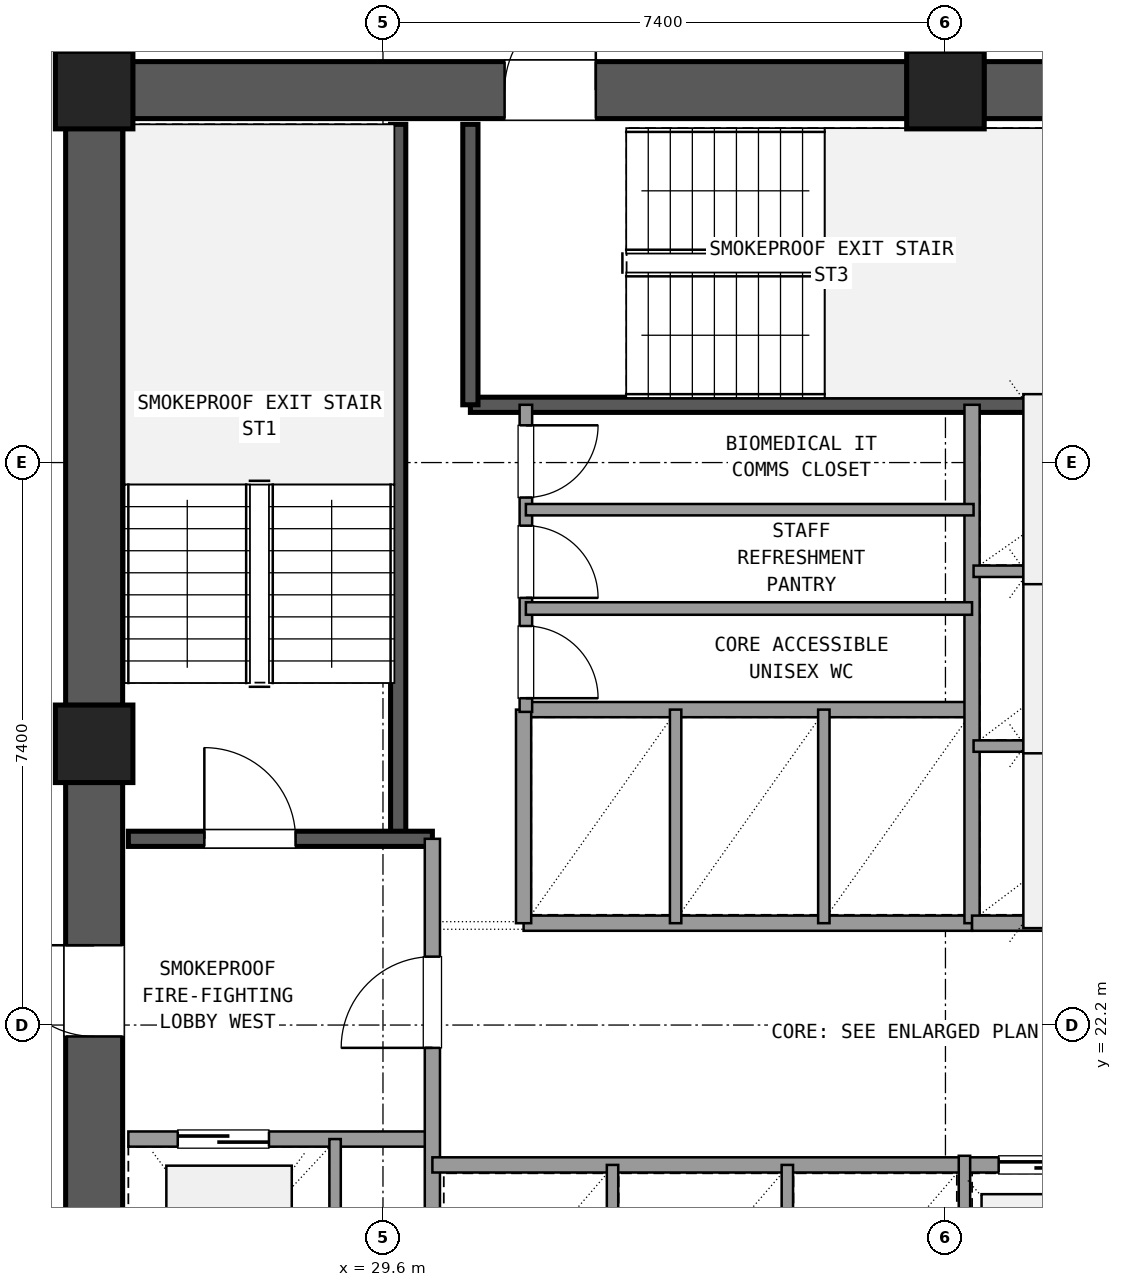
"""IFC4 building model, lengths in metres.
Left out: names, types, materials, properties, quantities, classifications, styles, units other than length and angle.
Written with IfcOpenShell. Run it as: python <this file> out.ifc"""

import sys

from ifc_helpers import new_model, si_unit, direction, frame, frame_2d, origin, origin_2d, place, context, subcontext, project, spatial, rectangle, extrude, element, fill, save


model = new_model("IFC4")
c1 = context("Model", 3, precision=1e-05, world=origin(), true_north=direction((0.0, 1.0)))
c2 = subcontext(c1, "Body", "Model", "MODEL_VIEW")
j1 = project(units=[si_unit("LENGTHUNIT", "METRE"), si_unit("PLANEANGLEUNIT", "RADIAN")], contexts=[c1])
p1 = place(None, origin())
s1 = spatial("IfcSite", under=j1, at=p1, CompositionType="ELEMENT")
p2 = place(p1, origin())
s2 = spatial("IfcBuilding", under=s1, at=p2, CompositionType="ELEMENT")
p3 = place(p2, frame((0.0, 0.0, 81.18)))
s3 = spatial("IfcBuildingStorey", under=s2, at=p3, CompositionType="ELEMENT", Elevation=81.18)
for number, where, z_axis, x_axis in (
    (1, (37.0, 34.5, 0.0), (0.0, 0.0, 1.0), (1.0, 0.0, 0.0)),
    (2, (25.8, 34.5, 0.0), (0.0, 0.0, 1.0), (1.0, 0.0, 0.0)),
    (3, (25.8, 25.9, 0.0), (0.0, 0.0, 1.0), (1.0, 0.0, 0.0)),
):
    element("IfcColumn", number, at=place(p3, frame(where, z_axis=z_axis, x_axis=x_axis)), inside=s3, PredefinedType="COLUMN", context=c2, shape_type="SweptSolid", body=[
        extrude(rectangle(XDim=1.02, YDim=1.02, at=origin_2d()), origin(), (0.0, 0.0, 1.0), 3.6),
    ])
p4 = place(p3, frame((47.695, 34.5, 0.0), z_axis=(0.0, 0.0, 1.0), x_axis=(-1.0, 0.0, 0.0)))
e4 = element("IfcWall", 4, at=p4, inside=s3, PredefinedType="SHEAR", context=c2, shape_type="SweptSolid", body=[
    extrude(rectangle(XDim=10.19, YDim=0.75, at=frame_2d((5.095, 0.0))), origin(), (0.0, 0.0, 1.0), 3.32),
])
p5 = place(p4, frame((4.595, 0.0, 0.0)))
e5 = element("IfcOpeningElement", 5, at=p5, cuts=e4, PredefinedType="OPENING", context=c2, shape_type="SweptSolid", body=[
    extrude(rectangle(XDim=1.6, YDim=2.2, at=frame_2d((0.8, 1.1))), frame((0.0, 0.385, 0.0), z_axis=(0.0, -1.0, 0.0), x_axis=(1.0, 0.0, 0.0)), (0.0, 0.0, 1.0), 0.77),
])
p6 = place(p3, frame((36.495, 34.5, 0.0), z_axis=(0.0, 0.0, 1.0), x_axis=(-1.0, 0.0, 0.0)))
e6 = element("IfcWall", 6, at=p6, inside=s3, PredefinedType="SHEAR", context=c2, shape_type="SweptSolid", body=[
    extrude(rectangle(XDim=10.19, YDim=0.75, at=frame_2d((5.095, 0.0))), origin(), (0.0, 0.0, 1.0), 3.32),
])
p7 = place(p6, frame((4.095, 0.0, 0.0)))
e7 = element("IfcOpeningElement", 7, at=p7, cuts=e6, PredefinedType="OPENING", context=c2, shape_type="SweptSolid", body=[
    extrude(rectangle(XDim=1.2, YDim=2.15, at=frame_2d((0.6, 1.075))), frame((0.0, 0.385, 0.0), z_axis=(0.0, -1.0, 0.0), x_axis=(1.0, 0.0, 0.0)), (0.0, 0.0, 1.0), 0.77),
])
p8 = place(p3, frame((25.8, 33.995, 0.0), z_axis=(0.0, 0.0, 1.0), x_axis=(0.0, -1.0, 0.0)))
e8 = element("IfcWall", 8, at=p8, inside=s3, PredefinedType="SHEAR", context=c2, shape_type="SweptSolid", body=[
    extrude(rectangle(XDim=7.59, YDim=0.75, at=frame_2d((3.795, 0.0))), origin(), (0.0, 0.0, 1.0), 3.32),
])
p9 = place(p3, frame((25.8, 25.395, 0.0), z_axis=(0.0, 0.0, 1.0), x_axis=(0.0, -1.0, 0.0)))
e9 = element("IfcWall", 9, at=p9, inside=s3, PredefinedType="SHEAR", context=c2, shape_type="SweptSolid", body=[
    extrude(rectangle(XDim=7.59, YDim=0.75, at=frame_2d((3.795, 0.0))), origin(), (0.0, 0.0, 1.0), 3.32),
])
p10 = place(p9, frame((2.145, 0.0, 0.0)))
e10 = element("IfcOpeningElement", 10, at=p10, cuts=e9, PredefinedType="OPENING", context=c2, shape_type="SweptSolid", body=[
    extrude(rectangle(XDim=1.2, YDim=2.15, at=frame_2d((0.6, 1.075))), frame((0.0, 0.385, 0.0), z_axis=(0.0, -1.0, 0.0), x_axis=(1.0, 0.0, 0.0)), (0.0, 0.0, 1.0), 0.77),
])
p11 = place(p3, frame((29.8, 24.65, 0.0), z_axis=(0.0, 0.0, 1.0), x_axis=(0.0, 1.0, 0.0)))
e11 = element("IfcWall", 11, at=p11, inside=s3, PredefinedType="SHEAR", context=c2, shape_type="SweptSolid", body=[
    extrude(rectangle(XDim=9.4, YDim=0.2, at=frame_2d((4.7, 0.0))), origin(), (0.0, 0.0, 1.0), 3.32),
])
p12 = place(p3, frame((26.25, 24.65, 0.0), z_axis=(0.0, 0.0, 1.0), x_axis=(1.0, 0.0, 0.0)))
e12 = element("IfcWall", 12, at=p12, inside=s3, PredefinedType="SHEAR", context=c2, shape_type="SweptSolid", body=[
    extrude(rectangle(XDim=4.0, YDim=0.2, at=frame_2d((2.0, 0.0))), origin(), (0.0, 0.0, 1.0), 3.32),
])
p13 = place(p12, frame((1.0, 0.0, 0.0)))
e13 = element("IfcOpeningElement", 13, at=p13, cuts=e12, PredefinedType="OPENING", context=c2, shape_type="SweptSolid", body=[
    extrude(rectangle(XDim=1.2, YDim=2.15, at=frame_2d((0.6, 1.075))), frame((0.0, 0.11, 0.0), z_axis=(0.0, -1.0, 0.0), x_axis=(1.0, 0.0, 0.0)), (0.0, 0.0, 1.0), 0.22),
])
p14 = place(p3, frame((30.75, 30.36, 0.0), z_axis=(0.0, 0.0, 1.0), x_axis=(1.0, 0.0, 0.0)))
e14 = element("IfcWall", 14, at=p14, inside=s3, PredefinedType="SHEAR", context=c2, shape_type="SweptSolid", body=[
    extrude(rectangle(XDim=9.5, YDim=0.2, at=frame_2d((4.75, 0.0))), origin(), (0.0, 0.0, 1.0), 3.32),
])
p15 = place(p3, frame((30.75, 30.36, 0.0), z_axis=(0.0, 0.0, 1.0), x_axis=(0.0, 1.0, 0.0)))
e15 = element("IfcWall", 15, at=p15, inside=s3, PredefinedType="SHEAR", context=c2, shape_type="SweptSolid", body=[
    extrude(rectangle(XDim=3.69, YDim=0.2, at=frame_2d((1.845, 0.0))), origin(), (0.0, 0.0, 1.0), 3.32),
])
p16 = place(p3, frame((26.25, 20.7, 0.0), z_axis=(0.0, 0.0, 1.0), x_axis=(1.0, 0.0, 0.0)))
e16 = element("IfcWall", 16, at=p16, inside=s3, PredefinedType="SOLIDWALL", context=c2, shape_type="SweptSolid", body=[
    extrude(rectangle(XDim=4.0, YDim=0.2, at=frame_2d((2.0, 0.0))), origin(), (0.0, 0.0, 1.0), 2.61),
])
p17 = place(p16, frame((0.65, 0.0, 0.0)))
e17 = element("IfcOpeningElement", 17, at=p17, cuts=e16, PredefinedType="OPENING", context=c2, shape_type="SweptSolid", body=[
    extrude(rectangle(XDim=1.2, YDim=2.15, at=frame_2d((0.6, 1.075))), frame((0.0, 0.11, 0.0), z_axis=(0.0, -1.0, 0.0), x_axis=(1.0, 0.0, 0.0)), (0.0, 0.0, 1.0), 0.22),
])
p18 = place(p3, frame((30.25, 17.75, 0.0), z_axis=(0.0, 0.0, 1.0), x_axis=(0.0, 1.0, 0.0)))
e18 = element("IfcWall", 18, at=p18, inside=s3, PredefinedType="SOLIDWALL", context=c2, shape_type="SweptSolid", body=[
    extrude(rectangle(XDim=6.9, YDim=0.2, at=frame_2d((3.45, 0.0))), origin(), (0.0, 0.0, 1.0), 2.61),
])
p19 = place(p18, frame((4.15, 0.0, 0.0)))
e19 = element("IfcOpeningElement", 19, at=p19, cuts=e18, PredefinedType="OPENING", context=c2, shape_type="SweptSolid", body=[
    extrude(rectangle(XDim=1.2, YDim=2.15, at=frame_2d((0.6, 1.075))), frame((0.0, 0.11, 0.0), z_axis=(0.0, -1.0, 0.0), x_axis=(1.0, 0.0, 0.0)), (0.0, 0.0, 1.0), 0.22),
])
p20 = place(p3, frame((28.97, 17.75, 0.0), z_axis=(0.0, 0.0, 1.0), x_axis=(0.0, 1.0, 0.0)))
e20 = element("IfcWall", 20, at=p20, inside=s3, PredefinedType="PARTITIONING", context=c2, shape_type="SweptSolid", body=[
    extrude(rectangle(XDim=2.95, YDim=0.15, at=frame_2d((1.475, 0.0))), origin(), (0.0, 0.0, 1.0), 2.61),
])
p21 = place(p3, frame((30.25, 20.36, 0.0), z_axis=(0.0, 0.0, 1.0), x_axis=(1.0, 0.0, 0.0)))
e21 = element("IfcWall", 21, at=p21, inside=s3, PredefinedType="SOLIDWALL", context=c2, shape_type="SweptSolid", body=[
    extrude(rectangle(XDim=7.0, YDim=0.2, at=frame_2d((3.5, 0.0))), origin(), (0.0, 0.0, 1.0), 2.61),
])
for number, where, z_axis, x_axis in (
    (22, (32.62, 17.75, 0.0), (0.0, 0.0, 1.0), (0.0, 1.0, 0.0)),
    (23, (34.92, 17.75, 0.0), (0.0, 0.0, 1.0), (0.0, 1.0, 0.0)),
):
    element("IfcWall", number, at=place(p3, frame(where, z_axis=z_axis, x_axis=x_axis)), inside=s3, PredefinedType="PARTITIONING", context=c2, shape_type="SweptSolid", body=[
        extrude(rectangle(XDim=2.61, YDim=0.15, at=frame_2d((1.305, 0.0))), origin(), (0.0, 0.0, 1.0), 2.61),
    ])
p22 = place(p3, frame((37.25, 20.36, 0.0), z_axis=(0.0, 0.0, 1.0), x_axis=(1.0, 0.0, 0.0)))
e24 = element("IfcWall", 24, at=p22, inside=s3, PredefinedType="SOLIDWALL", context=c2, shape_type="SweptSolid", body=[
    extrude(rectangle(XDim=6.1, YDim=0.2, at=frame_2d((3.05, 0.0))), origin(), (0.0, 0.0, 1.0), 2.61),
])
p23 = place(p22, frame((0.45, 0.0, 0.0)))
e25 = element("IfcOpeningElement", 25, at=p23, cuts=e24, PredefinedType="OPENING", context=c2, shape_type="SweptSolid", body=[
    extrude(rectangle(XDim=1.1, YDim=2.15, at=frame_2d((0.55, 1.075))), frame((0.0, 0.11, 0.0), z_axis=(0.0, -1.0, 0.0), x_axis=(1.0, 0.0, 0.0)), (0.0, 0.0, 1.0), 0.22),
])
p24 = place(p22, frame((2.5, 0.0, 0.0)))
e26 = element("IfcOpeningElement", 26, at=p24, cuts=e24, PredefinedType="OPENING", context=c2, shape_type="SweptSolid", body=[
    extrude(rectangle(XDim=1.1, YDim=2.15, at=frame_2d((0.55, 1.075))), frame((0.0, 0.11, 0.0), z_axis=(0.0, -1.0, 0.0), x_axis=(1.0, 0.0, 0.0)), (0.0, 0.0, 1.0), 0.22),
])
p25 = place(p22, frame((4.55, 0.0, 0.0)))
e27 = element("IfcOpeningElement", 27, at=p25, cuts=e24, PredefinedType="OPENING", context=c2, shape_type="SweptSolid", body=[
    extrude(rectangle(XDim=1.1, YDim=2.15, at=frame_2d((0.55, 1.075))), frame((0.0, 0.11, 0.0), z_axis=(0.0, -1.0, 0.0), x_axis=(1.0, 0.0, 0.0)), (0.0, 0.0, 1.0), 0.22),
])
p26 = place(p3, frame((37.25, 17.75, 0.0), z_axis=(0.0, 0.0, 1.0), x_axis=(0.0, 1.0, 0.0)))
e28 = element("IfcWall", 28, at=p26, inside=s3, PredefinedType="PARTITIONING", context=c2, shape_type="SweptSolid", body=[
    extrude(rectangle(XDim=2.73, YDim=0.15, at=frame_2d((1.365, 0.0))), origin(), (0.0, 0.0, 1.0), 2.61),
])
for number, where, z_axis, x_axis in (
    (29, (31.45, 23.54, 0.0), (0.0, 0.0, 1.0), (1.0, 0.0, 0.0)),
    (30, (31.45, 26.35, 0.0), (0.0, 0.0, 1.0), (1.0, 0.0, 0.0)),
):
    element("IfcWall", number, at=place(p3, frame(where, z_axis=z_axis, x_axis=x_axis)), inside=s3, PredefinedType="SOLIDWALL", context=c2, shape_type="SweptSolid", body=[
        extrude(rectangle(XDim=5.9, YDim=0.2, at=frame_2d((2.95, 0.0))), origin(), (0.0, 0.0, 1.0), 2.61),
    ])
p27 = place(p3, frame((31.45, 23.54, 0.0), z_axis=(0.0, 0.0, 1.0), x_axis=(0.0, 1.0, 0.0)))
e31 = element("IfcWall", 31, at=p27, inside=s3, PredefinedType="SOLIDWALL", context=c2, shape_type="SweptSolid", body=[
    extrude(rectangle(XDim=2.81, YDim=0.2, at=frame_2d((1.405, 0.0))), origin(), (0.0, 0.0, 1.0), 2.61),
])
for number, where, z_axis, x_axis in (
    (32, (33.45, 23.54, 0.0), (0.0, 0.0, 1.0), (0.0, 1.0, 0.0)),
    (33, (35.4, 23.54, 0.0), (0.0, 0.0, 1.0), (0.0, 1.0, 0.0)),
):
    element("IfcWall", number, at=place(p3, frame(where, z_axis=z_axis, x_axis=x_axis)), inside=s3, PredefinedType="PARTITIONING", context=c2, shape_type="SweptSolid", body=[
        extrude(rectangle(XDim=2.81, YDim=0.15, at=frame_2d((1.405, 0.0))), origin(), (0.0, 0.0, 1.0), 2.61),
    ])
p28 = place(p3, frame((37.35, 23.54, 0.0), z_axis=(0.0, 0.0, 1.0), x_axis=(0.0, 1.0, 0.0)))
e34 = element("IfcWall", 34, at=p28, inside=s3, PredefinedType="SOLIDWALL", context=c2, shape_type="SweptSolid", body=[
    extrude(rectangle(XDim=6.82, YDim=0.2, at=frame_2d((3.41, 0.0))), origin(), (0.0, 0.0, 1.0), 2.61),
])
p29 = place(p3, frame((37.35, 23.54, 0.0), z_axis=(0.0, 0.0, 1.0), x_axis=(1.0, 0.0, 0.0)))
e35 = element("IfcWall", 35, at=p29, inside=s3, PredefinedType="SOLIDWALL", context=c2, shape_type="SweptSolid", body=[
    extrude(rectangle(XDim=3.05, YDim=0.2, at=frame_2d((1.525, 0.0))), origin(), (0.0, 0.0, 1.0), 2.61),
])
for number, where, z_axis, x_axis in (
    (36, (37.37, 25.87, 0.0), (0.0, 0.0, 1.0), (1.0, 0.0, 0.0)),
    (37, (37.37, 28.17, 0.0), (0.0, 0.0, 1.0), (1.0, 0.0, 0.0)),
):
    element("IfcWall", number, at=place(p3, frame(where, z_axis=z_axis, x_axis=x_axis)), inside=s3, PredefinedType="PARTITIONING", context=c2, shape_type="SweptSolid", body=[
        extrude(rectangle(XDim=3.01, YDim=0.15, at=frame_2d((1.505, 0.0))), origin(), (0.0, 0.0, 1.0), 2.61),
    ])
p30 = place(p3, frame((31.48, 26.32, 0.0), z_axis=(0.0, 0.0, 1.0), x_axis=(0.0, 1.0, 0.0)))
e38 = element("IfcWall", 38, at=p30, inside=s3, PredefinedType="PLUMBINGWALL", context=c2, shape_type="SweptSolid", body=[
    extrude(rectangle(XDim=4.04, YDim=0.165, at=frame_2d((2.02, 0.0))), origin(), (0.0, 0.0, 1.0), 2.61),
])
p31 = place(p30, frame((0.18, 0.0, 0.0)))
e39 = element("IfcOpeningElement", 39, at=p31, cuts=e38, PredefinedType="OPENING", context=c2, shape_type="SweptSolid", body=[
    extrude(rectangle(XDim=0.95, YDim=2.1, at=frame_2d((0.475, 1.05))), frame((0.0, 0.093, 0.0), z_axis=(0.0, -1.0, 0.0), x_axis=(1.0, 0.0, 0.0)), (0.0, 0.0, 1.0), 0.185),
])
p32 = place(p30, frame((1.5, 0.0, 0.0)))
e40 = element("IfcOpeningElement", 40, at=p32, cuts=e38, PredefinedType="OPENING", context=c2, shape_type="SweptSolid", body=[
    extrude(rectangle(XDim=0.95, YDim=2.1, at=frame_2d((0.475, 1.05))), frame((0.0, 0.093, 0.0), z_axis=(0.0, -1.0, 0.0), x_axis=(1.0, 0.0, 0.0)), (0.0, 0.0, 1.0), 0.185),
])
p33 = place(p30, frame((2.82, 0.0, 0.0)))
e41 = element("IfcOpeningElement", 41, at=p33, cuts=e38, PredefinedType="OPENING", context=c2, shape_type="SweptSolid", body=[
    extrude(rectangle(XDim=0.95, YDim=2.1, at=frame_2d((0.475, 1.05))), frame((0.0, 0.093, 0.0), z_axis=(0.0, -1.0, 0.0), x_axis=(1.0, 0.0, 0.0)), (0.0, 0.0, 1.0), 0.185),
])
p34 = place(p3, frame((31.48, 27.68, 0.0), z_axis=(0.0, 0.0, 1.0), x_axis=(1.0, 0.0, 0.0)))
e42 = element("IfcWall", 42, at=p34, inside=s3, PredefinedType="PLUMBINGWALL", context=c2, shape_type="SweptSolid", body=[
    extrude(rectangle(XDim=5.87, YDim=0.165, at=frame_2d((2.935, 0.0))), origin(), (0.0, 0.0, 1.0), 2.61),
])
p35 = place(p3, frame((31.48, 28.98, 0.0), z_axis=(0.0, 0.0, 1.0), x_axis=(1.0, 0.0, 0.0)))
e43 = element("IfcWall", 43, at=p35, inside=s3, PredefinedType="PARTITIONING", context=c2, shape_type="SweptSolid", body=[
    extrude(rectangle(XDim=5.89, YDim=0.15, at=frame_2d((2.945, 0.0))), origin(), (0.0, 0.0, 1.0), 2.61),
])
p36 = place(p3, frame((37.0, 34.95, 0.0), z_axis=(0.0, 0.0, 1.0), x_axis=(0.0, 1.0, 0.0)))
e44 = element("IfcWall", 44, at=p36, inside=s3, PredefinedType="PARTITIONING", context=c2, shape_type="SweptSolid", body=[
    extrude(rectangle(XDim=3.21, YDim=0.18, at=frame_2d((1.605, 0.0))), origin(), (0.0, 0.0, 1.0), 2.61),
])
p37 = place(p36, frame((0.605, 0.0, 0.0)))
e45 = element("IfcOpeningElement", 45, at=p37, cuts=e44, PredefinedType="OPENING", context=c2, shape_type="SweptSolid", body=[
    extrude(rectangle(XDim=2.0, YDim=2.2, at=frame_2d((1.0, 1.1))), frame((0.0, 0.1, 0.0), z_axis=(0.0, -1.0, 0.0), x_axis=(1.0, 0.0, 0.0)), (0.0, 0.0, 1.0), 0.2),
])
p38 = place(p13, origin())
e46 = element("IfcDoor", 46, at=p38, inside=s3, OperationType="SINGLE_SWING_LEFT", PredefinedType="DOOR", context=c2, shape_type="SweptSolid", body=[
    extrude(rectangle(XDim=1.2, YDim=2.15, at=frame_2d((0.6, 1.075))), frame((0.0, 0.025, 0.0), z_axis=(0.0, -1.0, 0.0), x_axis=(1.0, 0.0, 0.0)), (0.0, 0.0, 1.0), 0.05),
])
fill(e13, e46)
p39 = place(p17, origin())
e47 = element("IfcDoor", 47, at=p39, inside=s3, OperationType="SLIDING_TO_LEFT", PredefinedType="DOOR", context=c2, shape_type="SweptSolid", body=[
    extrude(rectangle(XDim=1.2, YDim=2.15, at=frame_2d((0.6, 1.075))), frame((0.0, 0.025, 0.0), z_axis=(0.0, -1.0, 0.0), x_axis=(1.0, 0.0, 0.0)), (0.0, 0.0, 1.0), 0.05),
])
fill(e17, e47)
p40 = place(p19, origin())
e48 = element("IfcDoor", 48, at=p40, inside=s3, OperationType="SINGLE_SWING_LEFT", PredefinedType="DOOR", context=c2, shape_type="SweptSolid", body=[
    extrude(rectangle(XDim=1.2, YDim=2.15, at=frame_2d((0.6, 1.075))), frame((0.0, 0.025, 0.0), z_axis=(0.0, -1.0, 0.0), x_axis=(1.0, 0.0, 0.0)), (0.0, 0.0, 1.0), 0.05),
])
fill(e19, e48)
p41 = place(p10, frame((1.2, 0.0, 0.0), z_axis=(0.0, 0.0, 1.0), x_axis=(-1.0, 0.0, 0.0)))
e49 = element("IfcDoor", 49, at=p41, inside=s3, OperationType="SINGLE_SWING_LEFT", PredefinedType="DOOR", context=c2, shape_type="SweptSolid", body=[
    extrude(rectangle(XDim=1.2, YDim=2.15, at=frame_2d((0.6, 1.075))), frame((0.0, 0.025, 0.0), z_axis=(0.0, -1.0, 0.0), x_axis=(1.0, 0.0, 0.0)), (0.0, 0.0, 1.0), 0.05),
])
fill(e10, e49)
p42 = place(p7, frame((1.2, 0.0, 0.0), z_axis=(0.0, 0.0, 1.0), x_axis=(-1.0, 0.0, 0.0)))
e50 = element("IfcDoor", 50, at=p42, inside=s3, OperationType="SINGLE_SWING_LEFT", PredefinedType="DOOR", context=c2, shape_type="SweptSolid", body=[
    extrude(rectangle(XDim=1.2, YDim=2.15, at=frame_2d((0.6, 1.075))), frame((0.0, 0.025, 0.0), z_axis=(0.0, -1.0, 0.0), x_axis=(1.0, 0.0, 0.0)), (0.0, 0.0, 1.0), 0.05),
])
fill(e7, e50)
p43 = place(p23, origin())
e51 = element("IfcDoor", 51, at=p43, inside=s3, OperationType="SLIDING_TO_LEFT", PredefinedType="DOOR", context=c2, shape_type="SweptSolid", body=[
    extrude(rectangle(XDim=1.1, YDim=2.15, at=frame_2d((0.55, 1.075))), frame((0.0, 0.025, 0.0), z_axis=(0.0, -1.0, 0.0), x_axis=(1.0, 0.0, 0.0)), (0.0, 0.0, 1.0), 0.05),
])
fill(e25, e51)
p44 = place(p31, frame((0.95, 0.0, 0.0), z_axis=(0.0, 0.0, 1.0), x_axis=(-1.0, 0.0, 0.0)))
e52 = element("IfcDoor", 52, at=p44, inside=s3, OperationType="SINGLE_SWING_LEFT", PredefinedType="DOOR", context=c2, shape_type="SweptSolid", body=[
    extrude(rectangle(XDim=0.95, YDim=2.1, at=frame_2d((0.475, 1.05))), frame((0.0, 0.025, 0.0), z_axis=(0.0, -1.0, 0.0), x_axis=(1.0, 0.0, 0.0)), (0.0, 0.0, 1.0), 0.05),
])
fill(e39, e52)
p45 = place(p32, frame((0.95, 0.0, 0.0), z_axis=(0.0, 0.0, 1.0), x_axis=(-1.0, 0.0, 0.0)))
e53 = element("IfcDoor", 53, at=p45, inside=s3, OperationType="SINGLE_SWING_LEFT", PredefinedType="DOOR", context=c2, shape_type="SweptSolid", body=[
    extrude(rectangle(XDim=0.95, YDim=2.1, at=frame_2d((0.475, 1.05))), frame((0.0, 0.025, 0.0), z_axis=(0.0, -1.0, 0.0), x_axis=(1.0, 0.0, 0.0)), (0.0, 0.0, 1.0), 0.05),
])
fill(e40, e53)
p46 = place(p33, frame((0.95, 0.0, 0.0), z_axis=(0.0, 0.0, 1.0), x_axis=(-1.0, 0.0, 0.0)))
e54 = element("IfcDoor", 54, at=p46, inside=s3, OperationType="SINGLE_SWING_RIGHT", PredefinedType="DOOR", context=c2, shape_type="SweptSolid", body=[
    extrude(rectangle(XDim=0.95, YDim=2.1, at=frame_2d((0.475, 1.05))), frame((0.0, 0.025, 0.0), z_axis=(0.0, -1.0, 0.0), x_axis=(1.0, 0.0, 0.0)), (0.0, 0.0, 1.0), 0.05),
])
fill(e41, e54)
save(model, sys.argv[1])
